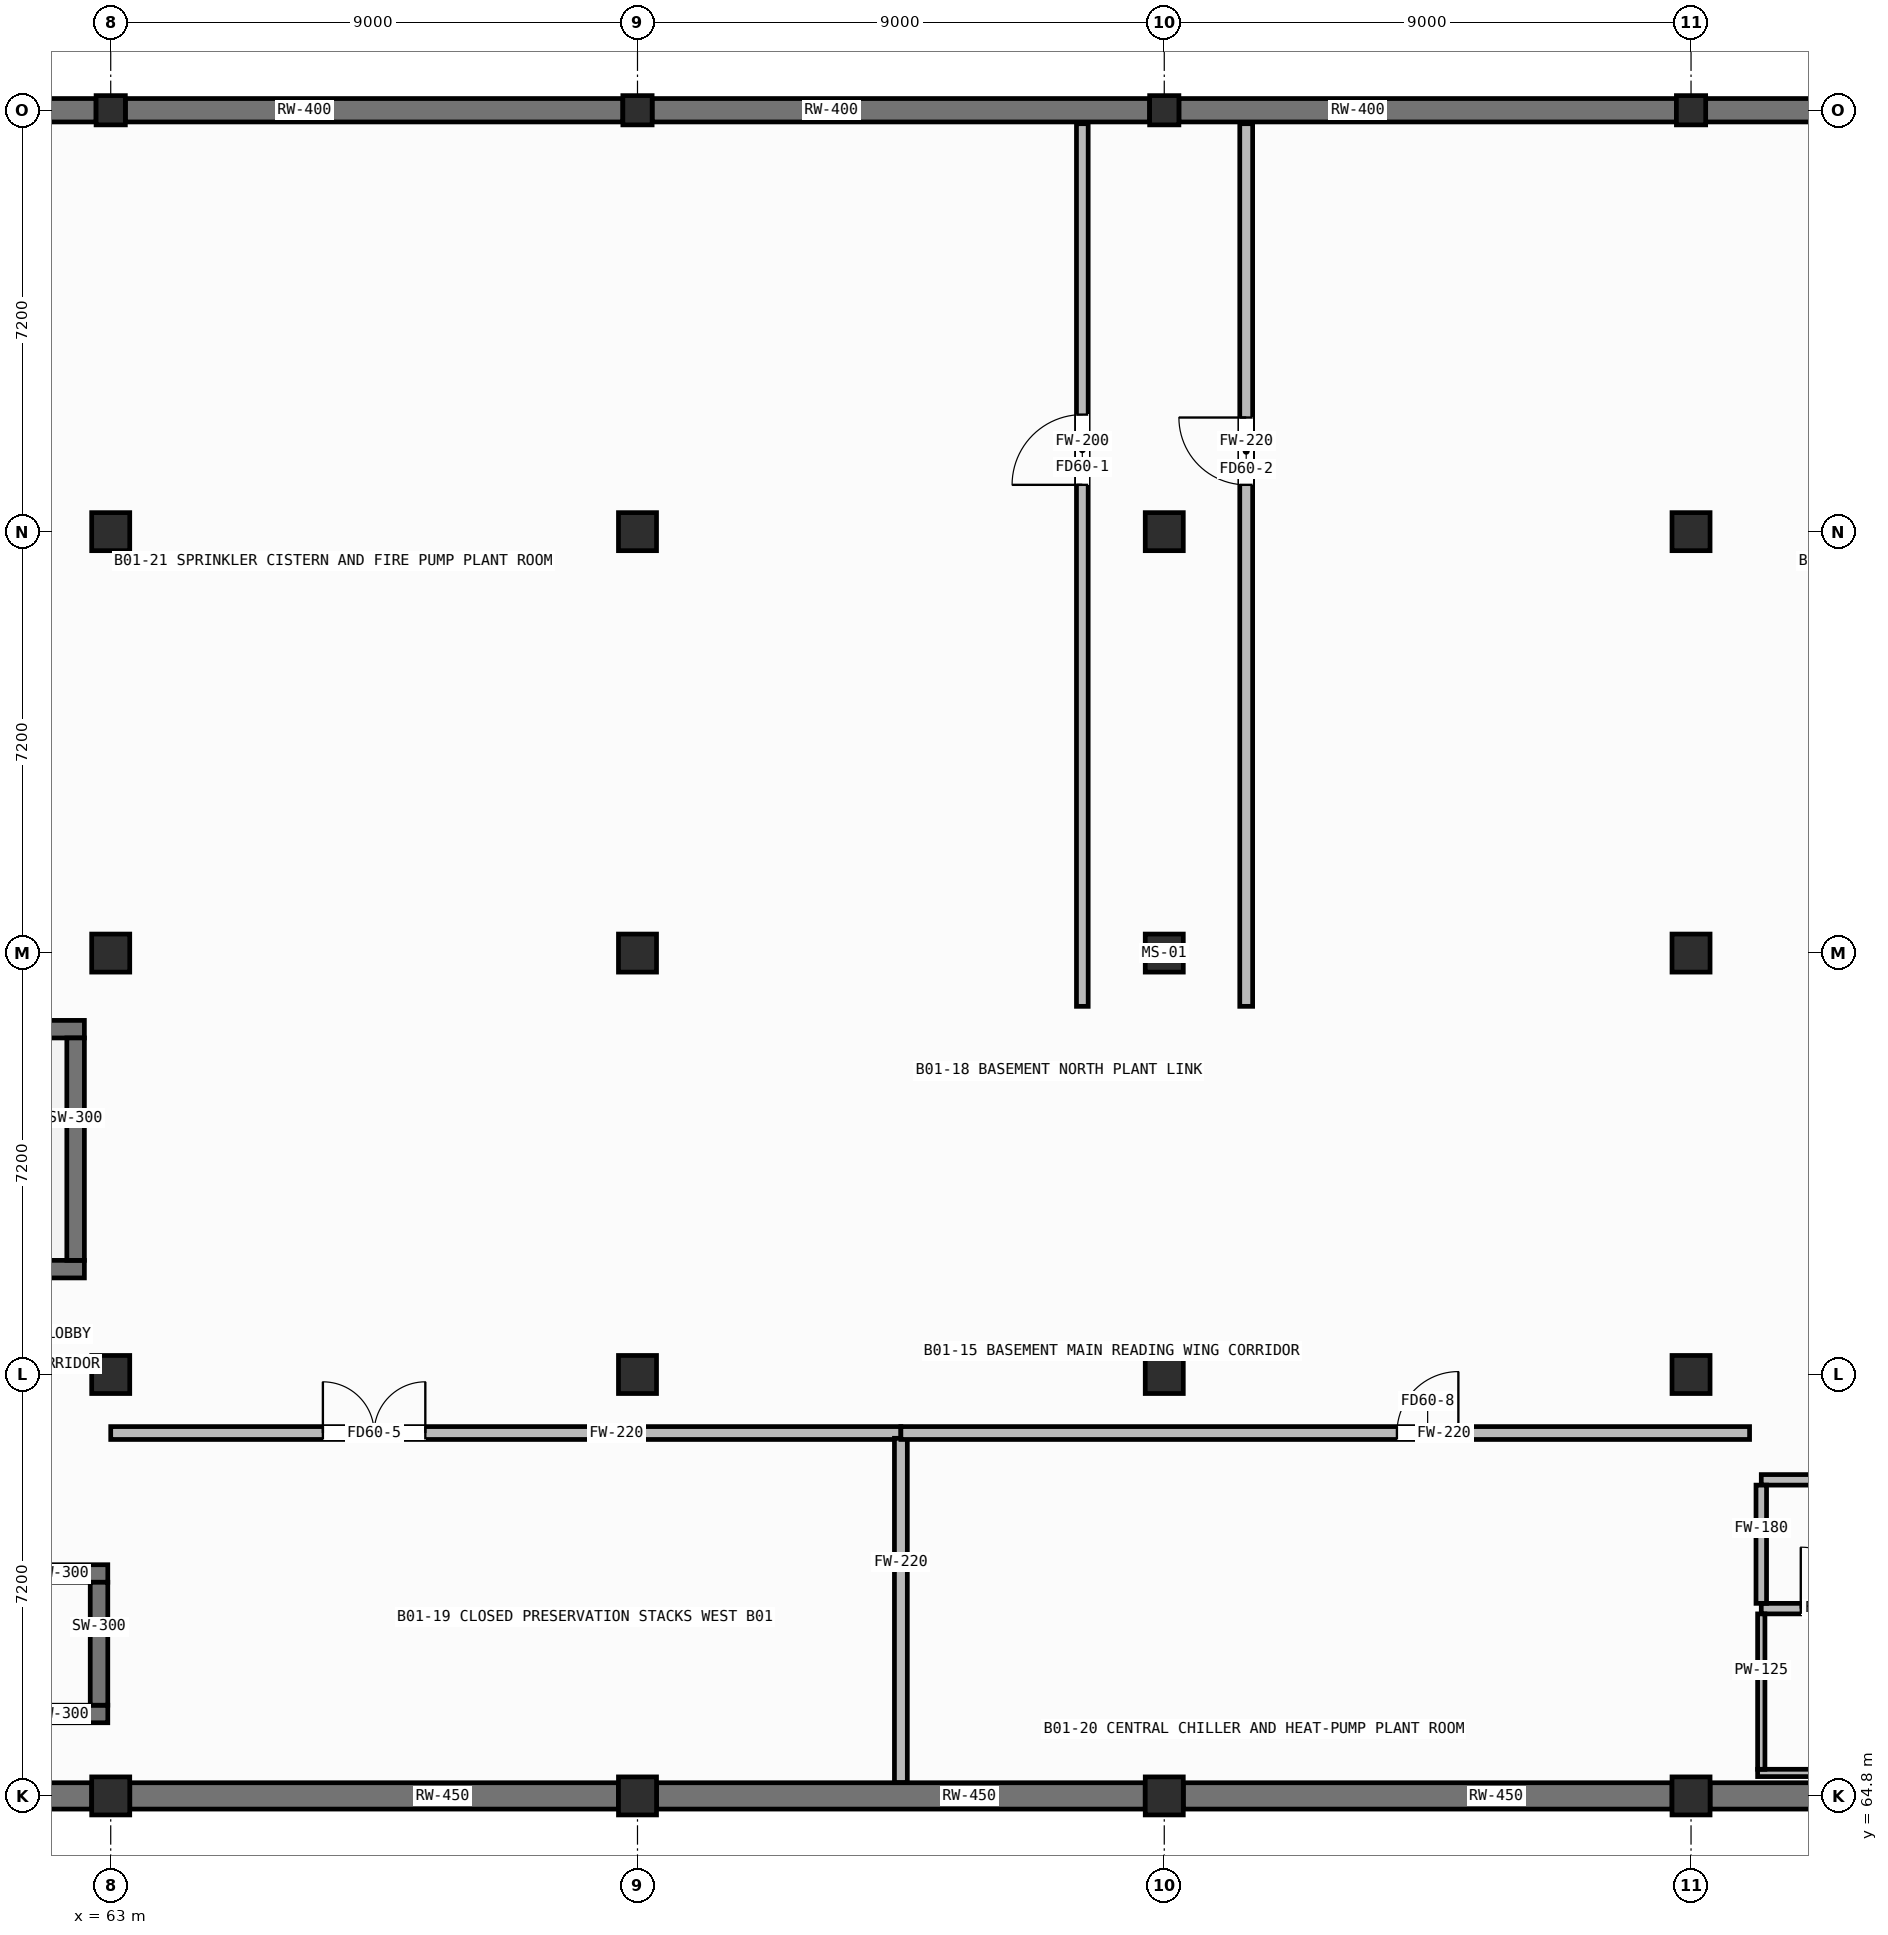
"""IFC4 building model, lengths in metres.
Left out: names, types, materials, properties, quantities, classifications, styles, units other than length and angle.
Written with IfcOpenShell. Run it as: python <this file> out.ifc"""

import sys

from ifc_helpers import new_model, si_unit, direction, frame, frame_2d, origin, origin_2d, place, context, subcontext, project, spatial, rectangle, hollow_rectangle, extrude, element, fill, save


model = new_model("IFC4")
c1 = context("Model", 3, precision=1e-05, world=origin(), true_north=direction((0.0, 1.0)))
c2 = subcontext(c1, "Body", "Model", "MODEL_VIEW")
j1 = project(units=[si_unit("LENGTHUNIT", "METRE"), si_unit("PLANEANGLEUNIT", "RADIAN")], contexts=[c1])
p1 = place(None, origin())
s1 = spatial("IfcSite", under=j1, at=p1, CompositionType="ELEMENT")
p2 = place(p1, origin())
s2 = spatial("IfcBuilding", under=s1, at=p2, CompositionType="ELEMENT")
p3 = place(p2, frame((0.0, 0.0, -4.9)))
s3 = spatial("IfcBuildingStorey", under=s2, at=p3, CompositionType="ELEMENT", Elevation=-4.9)
for number, where, z_axis, x_axis in (
    (1, (63.0, 64.8, 0.0), (0.0, 0.0, 1.0), (1.0, 0.0, 0.0)),
    (2, (63.0, 72.0, 0.0), (0.0, 0.0, 1.0), (1.0, 0.0, 0.0)),
    (3, (63.0, 79.2, 0.0), (0.0, 0.0, 1.0), (1.0, 0.0, 0.0)),
    (4, (63.0, 86.4, 0.0), (0.0, 0.0, 1.0), (1.0, 0.0, 0.0)),
):
    element("IfcColumn", number, at=place(p3, frame(where, z_axis=z_axis, x_axis=x_axis)), inside=s3, PredefinedType="COLUMN", context=c2, shape_type="SweptSolid", body=[
        extrude(hollow_rectangle(XDim=0.65, YDim=0.65, WallThickness=0.025, at=origin_2d()), origin(), (0.0, 0.0, 1.0), 4.9),
    ])
p4 = place(p3, frame((63.0, 93.6, 0.0), z_axis=(0.0, 0.0, 1.0), x_axis=(1.0, 0.0, 0.0)))
e5 = element("IfcColumn", 5, at=p4, inside=s3, PredefinedType="COLUMN", context=c2, shape_type="SweptSolid", body=[
    extrude(hollow_rectangle(XDim=0.5, YDim=0.5, WallThickness=0.022, at=origin_2d()), origin(), (0.0, 0.0, 1.0), 4.9),
])
for number, where, z_axis, x_axis in (
    (6, (72.0, 64.8, 0.0), (0.0, 0.0, 1.0), (1.0, 0.0, 0.0)),
    (7, (72.0, 72.0, 0.0), (0.0, 0.0, 1.0), (1.0, 0.0, 0.0)),
    (8, (72.0, 79.2, 0.0), (0.0, 0.0, 1.0), (1.0, 0.0, 0.0)),
    (9, (72.0, 86.4, 0.0), (0.0, 0.0, 1.0), (1.0, 0.0, 0.0)),
):
    element("IfcColumn", number, at=place(p3, frame(where, z_axis=z_axis, x_axis=x_axis)), inside=s3, PredefinedType="COLUMN", context=c2, shape_type="SweptSolid", body=[
        extrude(hollow_rectangle(XDim=0.65, YDim=0.65, WallThickness=0.025, at=origin_2d()), origin(), (0.0, 0.0, 1.0), 4.9),
    ])
p5 = place(p3, frame((72.0, 93.6, 0.0), z_axis=(0.0, 0.0, 1.0), x_axis=(1.0, 0.0, 0.0)))
e10 = element("IfcColumn", 10, at=p5, inside=s3, PredefinedType="COLUMN", context=c2, shape_type="SweptSolid", body=[
    extrude(hollow_rectangle(XDim=0.5, YDim=0.5, WallThickness=0.022, at=origin_2d()), origin(), (0.0, 0.0, 1.0), 4.9),
])
for number, where, z_axis, x_axis in (
    (11, (81.0, 64.8, 0.0), (0.0, 0.0, 1.0), (1.0, 0.0, 0.0)),
    (12, (81.0, 72.0, 0.0), (0.0, 0.0, 1.0), (1.0, 0.0, 0.0)),
    (13, (81.0, 79.2, 0.0), (0.0, 0.0, 1.0), (1.0, 0.0, 0.0)),
    (14, (81.0, 86.4, 0.0), (0.0, 0.0, 1.0), (1.0, 0.0, 0.0)),
):
    element("IfcColumn", number, at=place(p3, frame(where, z_axis=z_axis, x_axis=x_axis)), inside=s3, PredefinedType="COLUMN", context=c2, shape_type="SweptSolid", body=[
        extrude(hollow_rectangle(XDim=0.65, YDim=0.65, WallThickness=0.025, at=origin_2d()), origin(), (0.0, 0.0, 1.0), 4.9),
    ])
p6 = place(p3, frame((81.0, 93.6, 0.0), z_axis=(0.0, 0.0, 1.0), x_axis=(1.0, 0.0, 0.0)))
e15 = element("IfcColumn", 15, at=p6, inside=s3, PredefinedType="COLUMN", context=c2, shape_type="SweptSolid", body=[
    extrude(hollow_rectangle(XDim=0.5, YDim=0.5, WallThickness=0.022, at=origin_2d()), origin(), (0.0, 0.0, 1.0), 4.9),
])
for number, where, z_axis, x_axis in (
    (16, (90.0, 64.8, 0.0), (0.0, 0.0, 1.0), (1.0, 0.0, 0.0)),
    (17, (90.0, 72.0, 0.0), (0.0, 0.0, 1.0), (1.0, 0.0, 0.0)),
    (18, (90.0, 79.2, 0.0), (0.0, 0.0, 1.0), (1.0, 0.0, 0.0)),
    (19, (90.0, 86.4, 0.0), (0.0, 0.0, 1.0), (1.0, 0.0, 0.0)),
):
    element("IfcColumn", number, at=place(p3, frame(where, z_axis=z_axis, x_axis=x_axis)), inside=s3, PredefinedType="COLUMN", context=c2, shape_type="SweptSolid", body=[
        extrude(hollow_rectangle(XDim=0.65, YDim=0.65, WallThickness=0.025, at=origin_2d()), origin(), (0.0, 0.0, 1.0), 4.9),
    ])
p7 = place(p3, frame((90.0, 93.6, 0.0), z_axis=(0.0, 0.0, 1.0), x_axis=(1.0, 0.0, 0.0)))
e20 = element("IfcColumn", 20, at=p7, inside=s3, PredefinedType="COLUMN", context=c2, shape_type="SweptSolid", body=[
    extrude(hollow_rectangle(XDim=0.5, YDim=0.5, WallThickness=0.022, at=origin_2d()), origin(), (0.0, 0.0, 1.0), 4.9),
])
for number, where, z_axis, x_axis in (
    (21, (54.325, 64.8, 0.0), (0.0, 0.0, 1.0), (1.0, 0.0, 0.0)),
    (22, (63.325, 64.8, 0.0), (0.0, 0.0, 1.0), (1.0, 0.0, 0.0)),
    (23, (72.325, 64.8, 0.0), (0.0, 0.0, 1.0), (1.0, 0.0, 0.0)),
    (24, (81.325, 64.8, 0.0), (0.0, 0.0, 1.0), (1.0, 0.0, 0.0)),
    (25, (90.325, 64.8, 0.0), (0.0, 0.0, 1.0), (1.0, 0.0, 0.0)),
):
    element("IfcWall", number, at=place(p3, frame(where, z_axis=z_axis, x_axis=x_axis)), inside=s3, PredefinedType="SOLIDWALL", context=c2, shape_type="SweptSolid", body=[
        extrude(rectangle(XDim=8.35, YDim=0.45, at=frame_2d((4.175, 0.0))), origin(), (0.0, 0.0, 1.0), 4.125),
    ])
for number, where, z_axis, x_axis in (
    (26, (62.75, 93.6, 0.0), (0.0, 0.0, 1.0), (-1.0, 0.0, 0.0)),
    (27, (71.75, 93.6, 0.0), (0.0, 0.0, 1.0), (-1.0, 0.0, 0.0)),
    (28, (80.75, 93.6, 0.0), (0.0, 0.0, 1.0), (-1.0, 0.0, 0.0)),
    (29, (89.75, 93.6, 0.0), (0.0, 0.0, 1.0), (-1.0, 0.0, 0.0)),
    (30, (98.75, 93.6, 0.0), (0.0, 0.0, 1.0), (-1.0, 0.0, 0.0)),
):
    element("IfcWall", number, at=place(p3, frame(where, z_axis=z_axis, x_axis=x_axis)), inside=s3, PredefinedType="SOLIDWALL", context=c2, shape_type="SweptSolid", body=[
        extrude(rectangle(XDim=8.5, YDim=0.4, at=frame_2d((4.25, 0.0))), origin(), (0.0, 0.0, 1.0), 4.125),
    ])
p8 = place(p3, frame((54.45, 73.8, 0.0), z_axis=(0.0, 0.0, 1.0), x_axis=(1.0, 0.0, 0.0)))
e31 = element("IfcWall", 31, at=p8, inside=s3, PredefinedType="SHEAR", context=c2, shape_type="SweptSolid", body=[
    extrude(rectangle(XDim=8.1, YDim=0.3, at=frame_2d((4.05, 0.0))), origin(), (0.0, 0.0, 1.0), 4.625),
])
p9 = place(p8, frame((0.5, 0.0, 0.0)))
e32 = element("IfcOpeningElement", 32, at=p9, cuts=e31, PredefinedType="OPENING", context=c2, shape_type="SweptSolid", body=[
    extrude(rectangle(XDim=1.2, YDim=2.1, at=frame_2d((0.6, 1.05))), frame((0.0, 0.162, 0.0), z_axis=(0.0, -1.0, 0.0), x_axis=(1.0, 0.0, 0.0)), (0.0, 0.0, 1.0), 0.324),
])
p10 = place(p3, frame((54.45, 77.9, 0.0), z_axis=(0.0, 0.0, 1.0), x_axis=(1.0, 0.0, 0.0)))
e33 = element("IfcWall", 33, at=p10, inside=s3, PredefinedType="SHEAR", context=c2, shape_type="SweptSolid", body=[
    extrude(rectangle(XDim=8.1, YDim=0.3, at=frame_2d((4.05, 0.0))), origin(), (0.0, 0.0, 1.0), 4.625),
])
p11 = place(p3, frame((62.4, 73.95, 0.0), z_axis=(0.0, 0.0, 1.0), x_axis=(0.0, 1.0, 0.0)))
e34 = element("IfcWall", 34, at=p11, inside=s3, PredefinedType="SHEAR", context=c2, shape_type="SweptSolid", body=[
    extrude(rectangle(XDim=3.8, YDim=0.3, at=frame_2d((1.9, 0.0))), origin(), (0.0, 0.0, 1.0), 4.625),
])
for number, where, z_axis, x_axis in (
    (35, (60.775, 66.2, 0.0), (0.0, 0.0, 1.0), (1.0, 0.0, 0.0)),
    (36, (60.775, 68.6, 0.0), (0.0, 0.0, 1.0), (1.0, 0.0, 0.0)),
):
    element("IfcWall", number, at=place(p3, frame(where, z_axis=z_axis, x_axis=x_axis)), inside=s3, PredefinedType="SHEAR", context=c2, shape_type="SweptSolid", body=[
        extrude(rectangle(XDim=2.175, YDim=0.3, at=frame_2d((1.087, 0.0))), origin(), (0.0, 0.0, 1.0), 4.625),
    ])
p12 = place(p3, frame((62.8, 66.35, 0.0), z_axis=(0.0, 0.0, 1.0), x_axis=(0.0, 1.0, 0.0)))
e37 = element("IfcWall", 37, at=p12, inside=s3, PredefinedType="SHEAR", context=c2, shape_type="SweptSolid", body=[
    extrude(rectangle(XDim=2.1, YDim=0.3, at=frame_2d((1.05, 0.0))), origin(), (0.0, 0.0, 1.0), 4.625),
])
p13 = place(p3, frame((91.137, 65.192, 0.0), z_axis=(0.0, 0.0, 1.0), x_axis=(1.0, 0.0, 0.0)))
e38 = element("IfcWall", 38, at=p13, inside=s3, PredefinedType="PARTITIONING", context=c2, shape_type="SweptSolid", body=[
    extrude(rectangle(XDim=7.125, YDim=0.125, at=frame_2d((3.562, 0.0))), origin(), (0.0, 0.0, 1.0), 4.625),
])
p14 = place(p3, frame((91.2, 68.0, 0.0), z_axis=(0.0, 0.0, 1.0), x_axis=(1.0, 0.0, 0.0)))
e39 = element("IfcWall", 39, at=p14, inside=s3, PredefinedType="PARTITIONING", context=c2, shape_type="SweptSolid", body=[
    extrude(rectangle(XDim=7.0, YDim=0.18, at=frame_2d((3.5, 0.0))), origin(), (0.0, 0.0, 1.0), 4.625),
])
p15 = place(p14, frame((0.675, 0.0, 0.0)))
e40 = element("IfcOpeningElement", 40, at=p15, cuts=e39, PredefinedType="OPENING", context=c2, shape_type="SweptSolid", body=[
    extrude(rectangle(XDim=1.05, YDim=2.1, at=frame_2d((0.525, 1.05))), frame((0.0, 0.102, 0.0), z_axis=(0.0, -1.0, 0.0), x_axis=(1.0, 0.0, 0.0)), (0.0, 0.0, 1.0), 0.204),
])
p16 = place(p14, frame((3.11, 0.0, 0.0)))
e41 = element("IfcOpeningElement", 41, at=p16, cuts=e39, PredefinedType="OPENING", context=c2, shape_type="SweptSolid", body=[
    extrude(rectangle(XDim=0.98, YDim=2.02, at=frame_2d((0.49, 1.01))), frame((0.0, 0.102, 0.0), z_axis=(0.0, -1.0, 0.0), x_axis=(1.0, 0.0, 0.0)), (0.0, 0.0, 1.0), 0.204),
])
p17 = place(p14, frame((5.34, 0.0, 0.0)))
e42 = element("IfcOpeningElement", 42, at=p17, cuts=e39, PredefinedType="OPENING", context=c2, shape_type="SweptSolid", body=[
    extrude(rectangle(XDim=1.12, YDim=2.08, at=frame_2d((0.56, 1.04))), frame((0.0, 0.102, 0.0), z_axis=(0.0, -1.0, 0.0), x_axis=(1.0, 0.0, 0.0)), (0.0, 0.0, 1.0), 0.204),
])
p18 = place(p3, frame((91.2, 70.2, 0.0), z_axis=(0.0, 0.0, 1.0), x_axis=(1.0, 0.0, 0.0)))
e43 = element("IfcWall", 43, at=p18, inside=s3, PredefinedType="PARTITIONING", context=c2, shape_type="SweptSolid", body=[
    extrude(rectangle(XDim=7.0, YDim=0.18, at=frame_2d((3.5, 0.0))), origin(), (0.0, 0.0, 1.0), 4.625),
])
p19 = place(p18, frame((3.01, 0.0, 0.0)))
e44 = element("IfcOpeningElement", 44, at=p19, cuts=e43, PredefinedType="OPENING", context=c2, shape_type="SweptSolid", body=[
    extrude(rectangle(XDim=0.98, YDim=2.02, at=frame_2d((0.49, 1.01))), frame((0.0, 0.102, 0.0), z_axis=(0.0, -1.0, 0.0), x_axis=(1.0, 0.0, 0.0)), (0.0, 0.0, 1.0), 0.204),
])
p20 = place(p3, frame((91.2, 68.09, 0.0), z_axis=(0.0, 0.0, 1.0), x_axis=(0.0, 1.0, 0.0)))
e45 = element("IfcWall", 45, at=p20, inside=s3, PredefinedType="PARTITIONING", context=c2, shape_type="SweptSolid", body=[
    extrude(rectangle(XDim=2.02, YDim=0.18, at=frame_2d((1.01, 0.0))), origin(), (0.0, 0.0, 1.0), 4.625),
])
p21 = place(p3, frame((91.2, 65.255, 0.0), z_axis=(0.0, 0.0, 1.0), x_axis=(0.0, 1.0, 0.0)))
e46 = element("IfcWall", 46, at=p21, inside=s3, PredefinedType="PARTITIONING", context=c2, shape_type="SweptSolid", body=[
    extrude(rectangle(XDim=2.655, YDim=0.125, at=frame_2d((1.328, 0.0))), origin(), (0.0, 0.0, 1.0), 4.625),
])
p22 = place(p3, frame((63.0, 71.0, 0.0), z_axis=(0.0, 0.0, 1.0), x_axis=(1.0, 0.0, 0.0)))
e47 = element("IfcWall", 47, at=p22, inside=s3, PredefinedType="PARTITIONING", context=c2, shape_type="SweptSolid", body=[
    extrude(rectangle(XDim=13.5, YDim=0.22, at=frame_2d((6.75, 0.0))), origin(), (0.0, 0.0, 1.0), 4.625),
])
p23 = place(p22, frame((3.625, 0.0, 0.0)))
e48 = element("IfcOpeningElement", 48, at=p23, cuts=e47, PredefinedType="OPENING", context=c2, shape_type="SweptSolid", body=[
    extrude(rectangle(XDim=1.75, YDim=2.12, at=frame_2d((0.875, 1.06))), frame((0.0, 0.122, 0.0), z_axis=(0.0, -1.0, 0.0), x_axis=(1.0, 0.0, 0.0)), (0.0, 0.0, 1.0), 0.244),
])
p24 = place(p3, frame((76.5, 65.03, 0.0), z_axis=(0.0, 0.0, 1.0), x_axis=(0.0, 1.0, 0.0)))
e49 = element("IfcWall", 49, at=p24, inside=s3, PredefinedType="PARTITIONING", context=c2, shape_type="SweptSolid", body=[
    extrude(rectangle(XDim=5.88, YDim=0.22, at=frame_2d((2.94, 0.0))), origin(), (0.0, 0.0, 1.0), 4.625),
])
p25 = place(p3, frame((76.5, 71.0, 0.0), z_axis=(0.0, 0.0, 1.0), x_axis=(1.0, 0.0, 0.0)))
e50 = element("IfcWall", 50, at=p25, inside=s3, PredefinedType="PARTITIONING", context=c2, shape_type="SweptSolid", body=[
    extrude(rectangle(XDim=14.5, YDim=0.22, at=frame_2d((7.25, 0.0))), origin(), (0.0, 0.0, 1.0), 4.625),
])
p26 = place(p25, frame((8.475, 0.0, 0.0)))
e51 = element("IfcOpeningElement", 51, at=p26, cuts=e50, PredefinedType="OPENING", context=c2, shape_type="SweptSolid", body=[
    extrude(rectangle(XDim=1.05, YDim=2.02, at=frame_2d((0.525, 1.01))), frame((0.0, 0.122, 0.0), z_axis=(0.0, -1.0, 0.0), x_axis=(1.0, 0.0, 0.0)), (0.0, 0.0, 1.0), 0.244),
])
p27 = place(p3, frame((79.6, 78.29, 0.0), z_axis=(0.0, 0.0, 1.0), x_axis=(0.0, 1.0, 0.0)))
e52 = element("IfcWall", 52, at=p27, inside=s3, PredefinedType="PARTITIONING", context=c2, shape_type="SweptSolid", body=[
    extrude(rectangle(XDim=15.08, YDim=0.2, at=frame_2d((7.54, 0.0))), origin(), (0.0, 0.0, 1.0), 4.625),
])
p28 = place(p27, frame((8.91, 0.0, 0.0)))
e53 = element("IfcOpeningElement", 53, at=p28, cuts=e52, PredefinedType="OPENING", context=c2, shape_type="SweptSolid", body=[
    extrude(rectangle(XDim=1.2, YDim=2.1, at=frame_2d((0.6, 1.05))), frame((0.0, 0.112, 0.0), z_axis=(0.0, -1.0, 0.0), x_axis=(1.0, 0.0, 0.0)), (0.0, 0.0, 1.0), 0.224),
])
p29 = place(p3, frame((82.4, 78.29, 0.0), z_axis=(0.0, 0.0, 1.0), x_axis=(0.0, 1.0, 0.0)))
e54 = element("IfcWall", 54, at=p29, inside=s3, PredefinedType="PARTITIONING", context=c2, shape_type="SweptSolid", body=[
    extrude(rectangle(XDim=15.08, YDim=0.22, at=frame_2d((7.54, 0.0))), origin(), (0.0, 0.0, 1.0), 4.625),
])
p30 = place(p29, frame((8.91, 0.0, 0.0)))
e55 = element("IfcOpeningElement", 55, at=p30, cuts=e54, PredefinedType="OPENING", context=c2, shape_type="SweptSolid", body=[
    extrude(rectangle(XDim=1.15, YDim=2.1, at=frame_2d((0.575, 1.05))), frame((0.0, 0.122, 0.0), z_axis=(0.0, -1.0, 0.0), x_axis=(1.0, 0.0, 0.0)), (0.0, 0.0, 1.0), 0.244),
])
p31 = place(p15, origin())
e56 = element("IfcDoor", 56, at=p31, inside=s3, OperationType="SINGLE_SWING_LEFT", PredefinedType="DOOR", context=c2, shape_type="SweptSolid", body=[
    extrude(rectangle(XDim=1.05, YDim=2.1, at=frame_2d((0.525, 1.05))), frame((0.0, 0.025, 0.0), z_axis=(0.0, -1.0, 0.0), x_axis=(1.0, 0.0, 0.0)), (0.0, 0.0, 1.0), 0.05),
])
fill(e40, e56)
p32 = place(p23, origin())
e57 = element("IfcDoor", 57, at=p32, inside=s3, OperationType="DOUBLE_DOOR_SINGLE_SWING", PredefinedType="DOOR", context=c2, shape_type="SweptSolid", body=[
    extrude(rectangle(XDim=1.75, YDim=2.12, at=frame_2d((0.875, 1.06))), frame((0.0, 0.025, 0.0), z_axis=(0.0, -1.0, 0.0), x_axis=(1.0, 0.0, 0.0)), (0.0, 0.0, 1.0), 0.05),
])
fill(e48, e57)
p33 = place(p26, origin())
e58 = element("IfcDoor", 58, at=p33, inside=s3, OperationType="SINGLE_SWING_RIGHT", PredefinedType="DOOR", context=c2, shape_type="SweptSolid", body=[
    extrude(rectangle(XDim=1.05, YDim=2.02, at=frame_2d((0.525, 1.01))), frame((0.0, 0.025, 0.0), z_axis=(0.0, -1.0, 0.0), x_axis=(1.0, 0.0, 0.0)), (0.0, 0.0, 1.0), 0.05),
])
fill(e51, e58)
p34 = place(p28, origin())
e59 = element("IfcDoor", 59, at=p34, inside=s3, OperationType="SINGLE_SWING_LEFT", PredefinedType="DOOR", context=c2, shape_type="SweptSolid", body=[
    extrude(rectangle(XDim=1.2, YDim=2.1, at=frame_2d((0.6, 1.05))), frame((0.0, 0.025, 0.0), z_axis=(0.0, -1.0, 0.0), x_axis=(1.0, 0.0, 0.0)), (0.0, 0.0, 1.0), 0.05),
])
fill(e53, e59)
p35 = place(p30, origin())
e60 = element("IfcDoor", 60, at=p35, inside=s3, OperationType="SINGLE_SWING_RIGHT", PredefinedType="DOOR", context=c2, shape_type="SweptSolid", body=[
    extrude(rectangle(XDim=1.15, YDim=2.1, at=frame_2d((0.575, 1.05))), frame((0.0, 0.025, 0.0), z_axis=(0.0, -1.0, 0.0), x_axis=(1.0, 0.0, 0.0)), (0.0, 0.0, 1.0), 0.05),
])
fill(e55, e60)
save(model, sys.argv[1])
